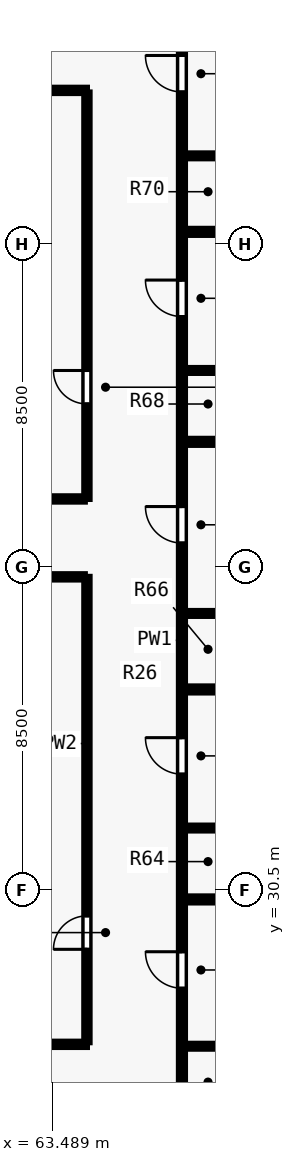
"""IFC4 building model, lengths in metres.
Left out: names, types, materials, properties, quantities, classifications, styles, units other than length and angle.
Written with IfcOpenShell. Run it as: python <this file> out.ifc"""

import sys

from ifc_helpers import new_model, si_unit, direction, frame, frame_2d, origin, place, context, subcontext, project, spatial, rectangle, extrude, element, fill, save


model = new_model("IFC4")
c1 = context("Model", 3, precision=1e-05, world=origin(), true_north=direction((0.0, 1.0)))
c2 = subcontext(c1, "Body", "Model", "MODEL_VIEW")
j1 = project(units=[si_unit("LENGTHUNIT", "METRE"), si_unit("PLANEANGLEUNIT", "RADIAN")], contexts=[c1])
p1 = place(None, origin())
s1 = spatial("IfcSite", under=j1, at=p1, CompositionType="ELEMENT")
p2 = place(p1, origin())
s2 = spatial("IfcBuilding", under=s1, at=p2, CompositionType="ELEMENT")
p3 = place(p2, frame((0.0, 0.0, 86.5)))
s3 = spatial("IfcBuildingStorey", under=s2, at=p3, CompositionType="ELEMENT", Elevation=86.5)
p4 = place(p3, frame((66.9, 24.015, 0.0), z_axis=(0.0, 0.0, 1.0), x_axis=(0.0, 1.0, 0.0)))
e1 = element("IfcWall", 1, at=p4, inside=s3, PredefinedType="PARTITIONING", context=c2, shape_type="SweptSolid", body=[
    extrude(rectangle(XDim=29.97, YDim=0.16, at=frame_2d((14.985, 0.0))), origin(), (0.0, 0.0, 1.0), 3.28),
])
p5 = place(p4, frame((3.911, 0.0, 0.0)))
e2 = element("IfcOpeningElement", 2, at=p5, cuts=e1, PredefinedType="OPENING", context=c2, shape_type="SweptSolid", body=[
    extrude(rectangle(XDim=0.96, YDim=2.15, at=frame_2d((0.48, 1.075))), frame((0.0, 0.09, 0.0), z_axis=(0.0, -1.0, 0.0), x_axis=(1.0, 0.0, 0.0)), (0.0, 0.0, 1.0), 0.18),
])
p6 = place(p4, frame((9.544, 0.0, 0.0)))
e3 = element("IfcOpeningElement", 3, at=p6, cuts=e1, PredefinedType="OPENING", context=c2, shape_type="SweptSolid", body=[
    extrude(rectangle(XDim=0.96, YDim=2.15, at=frame_2d((0.48, 1.075))), frame((0.0, 0.09, 0.0), z_axis=(0.0, -1.0, 0.0), x_axis=(1.0, 0.0, 0.0)), (0.0, 0.0, 1.0), 0.18),
])
p7 = place(p4, frame((15.625, 0.0, 0.0)))
e4 = element("IfcOpeningElement", 4, at=p7, cuts=e1, PredefinedType="OPENING", context=c2, shape_type="SweptSolid", body=[
    extrude(rectangle(XDim=0.96, YDim=2.15, at=frame_2d((0.48, 1.075))), frame((0.0, 0.09, 0.0), z_axis=(0.0, -1.0, 0.0), x_axis=(1.0, 0.0, 0.0)), (0.0, 0.0, 1.0), 0.18),
])
p8 = place(p4, frame((21.584, 0.0, 0.0)))
e5 = element("IfcOpeningElement", 5, at=p8, cuts=e1, PredefinedType="OPENING", context=c2, shape_type="SweptSolid", body=[
    extrude(rectangle(XDim=0.96, YDim=2.15, at=frame_2d((0.48, 1.075))), frame((0.0, 0.09, 0.0), z_axis=(0.0, -1.0, 0.0), x_axis=(1.0, 0.0, 0.0)), (0.0, 0.0, 1.0), 0.18),
])
p9 = place(p4, frame((27.494, 0.0, 0.0)))
e6 = element("IfcOpeningElement", 6, at=p9, cuts=e1, PredefinedType="OPENING", context=c2, shape_type="SweptSolid", body=[
    extrude(rectangle(XDim=0.96, YDim=2.15, at=frame_2d((0.48, 1.075))), frame((0.0, 0.09, 0.0), z_axis=(0.0, -1.0, 0.0), x_axis=(1.0, 0.0, 0.0)), (0.0, 0.0, 1.0), 0.18),
])
p10 = place(p3, frame((39.6, 26.45, 0.0), z_axis=(0.0, 0.0, 1.0), x_axis=(1.0, 0.0, 0.0)))
e7 = element("IfcWall", 7, at=p10, inside=s3, PredefinedType="PARTITIONING", context=c2, shape_type="SweptSolid", body=[
    extrude(rectangle(XDim=24.8, YDim=0.14, at=frame_2d((12.4, 0.0))), origin(), (0.0, 0.0, 1.0), 3.28),
])
p11 = place(p10, frame((1.2, 0.0, 0.0)))
e8 = element("IfcOpeningElement", 8, at=p11, cuts=e7, PredefinedType="OPENING", context=c2, shape_type="SweptSolid", body=[
    extrude(rectangle(XDim=0.88, YDim=2.1, at=frame_2d((0.44, 1.05))), frame((0.0, 0.08, 0.0), z_axis=(0.0, -1.0, 0.0), x_axis=(1.0, 0.0, 0.0)), (0.0, 0.0, 1.0), 0.16),
])
p12 = place(p10, frame((8.9, 0.0, 0.0)))
e9 = element("IfcOpeningElement", 9, at=p12, cuts=e7, PredefinedType="OPENING", context=c2, shape_type="SweptSolid", body=[
    extrude(rectangle(XDim=0.88, YDim=2.1, at=frame_2d((0.44, 1.05))), frame((0.0, 0.08, 0.0), z_axis=(0.0, -1.0, 0.0), x_axis=(1.0, 0.0, 0.0)), (0.0, 0.0, 1.0), 0.16),
])
p13 = place(p10, frame((19.4, 0.0, 0.0)))
e10 = element("IfcOpeningElement", 10, at=p13, cuts=e7, PredefinedType="OPENING", context=c2, shape_type="SweptSolid", body=[
    extrude(rectangle(XDim=0.88, YDim=2.1, at=frame_2d((0.44, 1.05))), frame((0.0, 0.08, 0.0), z_axis=(0.0, -1.0, 0.0), x_axis=(1.0, 0.0, 0.0)), (0.0, 0.0, 1.0), 0.16),
])
p14 = place(p3, frame((39.6, 51.55, 0.0), z_axis=(0.0, 0.0, 1.0), x_axis=(1.0, 0.0, 0.0)))
e11 = element("IfcWall", 11, at=p14, inside=s3, PredefinedType="PARTITIONING", context=c2, shape_type="SweptSolid", body=[
    extrude(rectangle(XDim=24.8, YDim=0.14, at=frame_2d((12.4, 0.0))), origin(), (0.0, 0.0, 1.0), 3.28),
])
p15 = place(p14, frame((2.2, 0.0, 0.0)))
e12 = element("IfcOpeningElement", 12, at=p15, cuts=e11, PredefinedType="OPENING", context=c2, shape_type="SweptSolid", body=[
    extrude(rectangle(XDim=0.88, YDim=2.1, at=frame_2d((0.44, 1.05))), frame((0.0, 0.08, 0.0), z_axis=(0.0, -1.0, 0.0), x_axis=(1.0, 0.0, 0.0)), (0.0, 0.0, 1.0), 0.16),
])
p16 = place(p14, frame((12.9, 0.0, 0.0)))
e13 = element("IfcOpeningElement", 13, at=p16, cuts=e11, PredefinedType="OPENING", context=c2, shape_type="SweptSolid", body=[
    extrude(rectangle(XDim=0.88, YDim=2.1, at=frame_2d((0.44, 1.05))), frame((0.0, 0.08, 0.0), z_axis=(0.0, -1.0, 0.0), x_axis=(1.0, 0.0, 0.0)), (0.0, 0.0, 1.0), 0.16),
])
p17 = place(p14, frame((22.4, 0.0, 0.0)))
e14 = element("IfcOpeningElement", 14, at=p17, cuts=e11, PredefinedType="OPENING", context=c2, shape_type="SweptSolid", body=[
    extrude(rectangle(XDim=0.88, YDim=2.1, at=frame_2d((0.44, 1.05))), frame((0.0, 0.08, 0.0), z_axis=(0.0, -1.0, 0.0), x_axis=(1.0, 0.0, 0.0)), (0.0, 0.0, 1.0), 0.16),
])
p18 = place(p3, frame((64.4, 26.505, 0.0), z_axis=(0.0, 0.0, 1.0), x_axis=(0.0, 1.0, 0.0)))
e15 = element("IfcWall", 15, at=p18, inside=s3, PredefinedType="PARTITIONING", context=c2, shape_type="SweptSolid", body=[
    extrude(rectangle(XDim=12.245, YDim=0.14, at=frame_2d((6.123, 0.0))), origin(), (0.0, 0.0, 1.0), 3.28),
])
p19 = place(p18, frame((2.445, 0.0, 0.0)))
e16 = element("IfcOpeningElement", 16, at=p19, cuts=e15, PredefinedType="OPENING", context=c2, shape_type="SweptSolid", body=[
    extrude(rectangle(XDim=0.88, YDim=2.1, at=frame_2d((0.44, 1.05))), frame((0.0, 0.08, 0.0), z_axis=(0.0, -1.0, 0.0), x_axis=(1.0, 0.0, 0.0)), (0.0, 0.0, 1.0), 0.16),
])
p20 = place(p3, frame((64.4, 40.8, 0.0), z_axis=(0.0, 0.0, 1.0), x_axis=(0.0, 1.0, 0.0)))
e17 = element("IfcWall", 17, at=p20, inside=s3, PredefinedType="PARTITIONING", context=c2, shape_type="SweptSolid", body=[
    extrude(rectangle(XDim=10.695, YDim=0.14, at=frame_2d((5.348, 0.0))), origin(), (0.0, 0.0, 1.0), 3.28),
])
p21 = place(p20, frame((2.5, 0.0, 0.0)))
e18 = element("IfcOpeningElement", 18, at=p21, cuts=e17, PredefinedType="OPENING", context=c2, shape_type="SweptSolid", body=[
    extrude(rectangle(XDim=0.88, YDim=2.1, at=frame_2d((0.44, 1.05))), frame((0.0, 0.08, 0.0), z_axis=(0.0, -1.0, 0.0), x_axis=(1.0, 0.0, 0.0)), (0.0, 0.0, 1.0), 0.16),
])
for number, where, z_axis, x_axis in (
    (19, (60.76, 38.75, 0.0), (0.0, 0.0, 1.0), (1.0, 0.0, 0.0)),
    (20, (60.76, 40.8, 0.0), (0.0, 0.0, 1.0), (1.0, 0.0, 0.0)),
):
    element("IfcWall", number, at=place(p3, frame(where, z_axis=z_axis, x_axis=x_axis)), inside=s3, PredefinedType="PARTITIONING", context=c2, shape_type="SweptSolid", body=[
        extrude(rectangle(XDim=3.585, YDim=0.14, at=frame_2d((1.792, 0.0))), origin(), (0.0, 0.0, 1.0), 3.28),
    ])
p22 = place(p3, frame((66.965, 26.4, 0.0), z_axis=(0.0, 0.0, 1.0), x_axis=(1.0, 0.0, 0.0)))
e21 = element("IfcWall", 21, at=p22, inside=s3, PredefinedType="PLUMBINGWALL", context=c2, shape_type="SweptSolid", body=[
    extrude(rectangle(XDim=2.235, YDim=0.13, at=frame_2d((1.117, 0.0))), origin(), (0.0, 0.0, 1.0), 3.28),
])
p23 = place(p3, frame((66.965, 30.262, 0.0), z_axis=(0.0, 0.0, 1.0), x_axis=(1.0, 0.0, 0.0)))
e22 = element("IfcWall", 22, at=p23, inside=s3, PredefinedType="PARTITIONING", context=c2, shape_type="SweptSolid", body=[
    extrude(rectangle(XDim=10.19, YDim=0.16, at=frame_2d((5.095, 0.0))), origin(), (0.0, 0.0, 1.0), 3.28),
])
p24 = place(p3, frame((66.965, 32.141, 0.0), z_axis=(0.0, 0.0, 1.0), x_axis=(1.0, 0.0, 0.0)))
e23 = element("IfcWall", 23, at=p24, inside=s3, PredefinedType="PLUMBINGWALL", context=c2, shape_type="SweptSolid", body=[
    extrude(rectangle(XDim=2.235, YDim=0.13, at=frame_2d((1.117, 0.0))), origin(), (0.0, 0.0, 1.0), 2.439),
])
p25 = place(p3, frame((66.965, 35.788, 0.0), z_axis=(0.0, 0.0, 1.0), x_axis=(1.0, 0.0, 0.0)))
e24 = element("IfcWall", 24, at=p25, inside=s3, PredefinedType="PARTITIONING", context=c2, shape_type="SweptSolid", body=[
    extrude(rectangle(XDim=10.19, YDim=0.16, at=frame_2d((5.095, 0.0))), origin(), (0.0, 0.0, 1.0), 3.28),
])
p26 = place(p3, frame((66.965, 37.788, 0.0), z_axis=(0.0, 0.0, 1.0), x_axis=(1.0, 0.0, 0.0)))
e25 = element("IfcWall", 25, at=p26, inside=s3, PredefinedType="PLUMBINGWALL", context=c2, shape_type="SweptSolid", body=[
    extrude(rectangle(XDim=2.235, YDim=0.13, at=frame_2d((1.117, 0.0))), origin(), (0.0, 0.0, 1.0), 3.28),
])
p27 = place(p3, frame((66.965, 42.302, 0.0), z_axis=(0.0, 0.0, 1.0), x_axis=(1.0, 0.0, 0.0)))
e26 = element("IfcWall", 26, at=p27, inside=s3, PredefinedType="PARTITIONING", context=c2, shape_type="SweptSolid", body=[
    extrude(rectangle(XDim=10.19, YDim=0.16, at=frame_2d((5.095, 0.0))), origin(), (0.0, 0.0, 1.0), 3.28),
])
p28 = place(p3, frame((66.965, 44.181, 0.0), z_axis=(0.0, 0.0, 1.0), x_axis=(1.0, 0.0, 0.0)))
e27 = element("IfcWall", 27, at=p28, inside=s3, PredefinedType="PLUMBINGWALL", context=c2, shape_type="SweptSolid", body=[
    extrude(rectangle(XDim=2.235, YDim=0.13, at=frame_2d((1.117, 0.0))), origin(), (0.0, 0.0, 1.0), 3.28),
])
p29 = place(p3, frame((66.965, 47.827, 0.0), z_axis=(0.0, 0.0, 1.0), x_axis=(1.0, 0.0, 0.0)))
e28 = element("IfcWall", 28, at=p29, inside=s3, PredefinedType="PARTITIONING", context=c2, shape_type="SweptSolid", body=[
    extrude(rectangle(XDim=10.19, YDim=0.16, at=frame_2d((5.095, 0.0))), origin(), (0.0, 0.0, 1.0), 3.28),
])
p30 = place(p3, frame((66.965, 49.827, 0.0), z_axis=(0.0, 0.0, 1.0), x_axis=(1.0, 0.0, 0.0)))
e29 = element("IfcWall", 29, at=p30, inside=s3, PredefinedType="PLUMBINGWALL", context=c2, shape_type="SweptSolid", body=[
    extrude(rectangle(XDim=2.235, YDim=0.13, at=frame_2d((1.117, 0.0))), origin(), (0.0, 0.0, 1.0), 3.28),
])
p31 = place(p19, origin())
e30 = element("IfcDoor", 30, at=p31, inside=s3, OperationType="SINGLE_SWING_LEFT", PredefinedType="DOOR", context=c2, shape_type="SweptSolid", body=[
    extrude(rectangle(XDim=0.88, YDim=2.1, at=frame_2d((0.44, 1.05))), frame((0.0, 0.025, 0.0), z_axis=(0.0, -1.0, 0.0), x_axis=(1.0, 0.0, 0.0)), (0.0, 0.0, 1.0), 0.05),
])
fill(e16, e30)
p32 = place(p21, origin())
e31 = element("IfcDoor", 31, at=p32, inside=s3, OperationType="SINGLE_SWING_RIGHT", PredefinedType="DOOR", context=c2, shape_type="SweptSolid", body=[
    extrude(rectangle(XDim=0.88, YDim=2.1, at=frame_2d((0.44, 1.05))), frame((0.0, 0.025, 0.0), z_axis=(0.0, -1.0, 0.0), x_axis=(1.0, 0.0, 0.0)), (0.0, 0.0, 1.0), 0.05),
])
fill(e18, e31)
p33 = place(p5, origin())
e32 = element("IfcDoor", 32, at=p33, inside=s3, OperationType="SINGLE_SWING_RIGHT", PredefinedType="DOOR", context=c2, shape_type="SweptSolid", body=[
    extrude(rectangle(XDim=0.96, YDim=2.15, at=frame_2d((0.48, 1.075))), frame((0.0, 0.025, 0.0), z_axis=(0.0, -1.0, 0.0), x_axis=(1.0, 0.0, 0.0)), (0.0, 0.0, 1.0), 0.05),
])
fill(e2, e32)
p34 = place(p6, origin())
e33 = element("IfcDoor", 33, at=p34, inside=s3, OperationType="SINGLE_SWING_RIGHT", PredefinedType="DOOR", context=c2, shape_type="SweptSolid", body=[
    extrude(rectangle(XDim=0.96, YDim=2.15, at=frame_2d((0.48, 1.075))), frame((0.0, 0.025, 0.0), z_axis=(0.0, -1.0, 0.0), x_axis=(1.0, 0.0, 0.0)), (0.0, 0.0, 1.0), 0.05),
])
fill(e3, e33)
p35 = place(p7, origin())
e34 = element("IfcDoor", 34, at=p35, inside=s3, OperationType="SINGLE_SWING_RIGHT", PredefinedType="DOOR", context=c2, shape_type="SweptSolid", body=[
    extrude(rectangle(XDim=0.96, YDim=2.15, at=frame_2d((0.48, 1.075))), frame((0.0, 0.025, 0.0), z_axis=(0.0, -1.0, 0.0), x_axis=(1.0, 0.0, 0.0)), (0.0, 0.0, 1.0), 0.05),
])
fill(e4, e34)
p36 = place(p8, origin())
e35 = element("IfcDoor", 35, at=p36, inside=s3, OperationType="SINGLE_SWING_RIGHT", PredefinedType="DOOR", context=c2, shape_type="SweptSolid", body=[
    extrude(rectangle(XDim=0.96, YDim=2.15, at=frame_2d((0.48, 1.075))), frame((0.0, 0.025, 0.0), z_axis=(0.0, -1.0, 0.0), x_axis=(1.0, 0.0, 0.0)), (0.0, 0.0, 1.0), 0.05),
])
fill(e5, e35)
p37 = place(p9, origin())
e36 = element("IfcDoor", 36, at=p37, inside=s3, OperationType="SINGLE_SWING_RIGHT", PredefinedType="DOOR", context=c2, shape_type="SweptSolid", body=[
    extrude(rectangle(XDim=0.96, YDim=2.15, at=frame_2d((0.48, 1.075))), frame((0.0, 0.025, 0.0), z_axis=(0.0, -1.0, 0.0), x_axis=(1.0, 0.0, 0.0)), (0.0, 0.0, 1.0), 0.05),
])
fill(e6, e36)
save(model, sys.argv[1])
